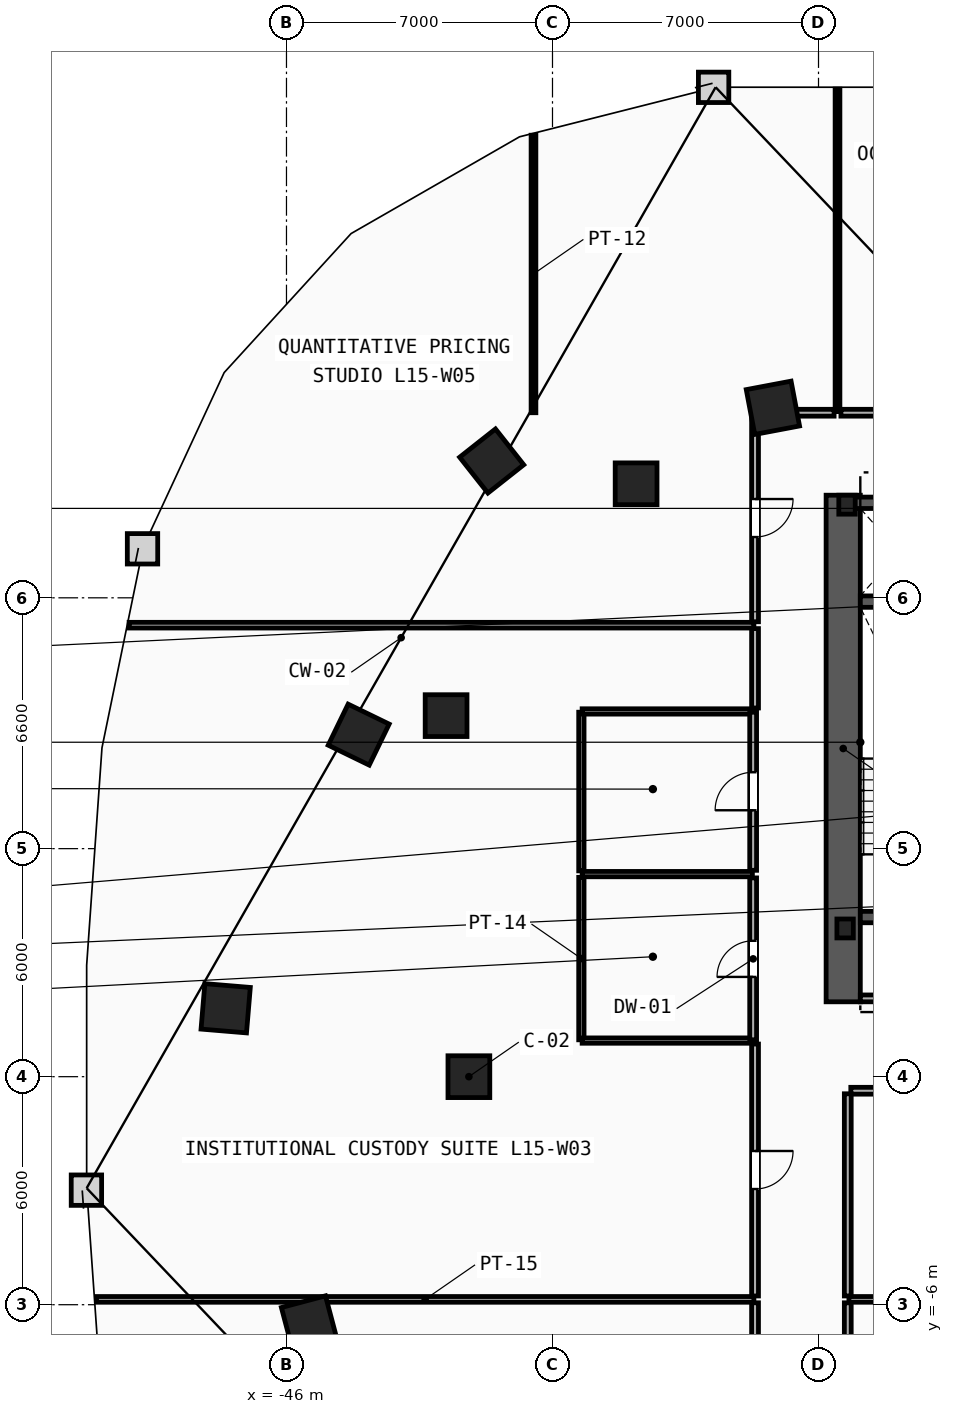
"""IFC4 building model, lengths in metres.
Left out: names, types, materials, properties, quantities, classifications, styles, units other than length and angle.
Written with IfcOpenShell. Run it as: python <this file> out.ifc"""

import sys

from ifc_helpers import new_model, si_unit, direction, frame, frame_2d, origin, origin_2d, place, context, subcontext, project, spatial, rectangle, i_section, extrude, element, fill, save


model = new_model("IFC4")
c1 = context("Model", 3, precision=1e-05, world=origin(), true_north=direction((0.0, 1.0)))
c2 = subcontext(c1, "Body", "Model", "MODEL_VIEW")
j1 = project(units=[si_unit("LENGTHUNIT", "METRE"), si_unit("PLANEANGLEUNIT", "RADIAN")], contexts=[c1])
p1 = place(None, origin())
s1 = spatial("IfcSite", under=j1, at=p1, CompositionType="ELEMENT")
p2 = place(p1, origin())
s2 = spatial("IfcBuilding", under=s1, at=p2, CompositionType="ELEMENT")
p3 = place(p2, frame((0.0, 0.0, 62.0)))
s3 = spatial("IfcBuildingStorey", under=s2, at=p3, CompositionType="ELEMENT", Elevation=62.0)
for number, where, z_axis, x_axis in (
    (1, (-31.3, 3.9, 0.0), (0.0, 0.0, 1.0), (1.0, 0.0, 0.0)),
    (2, (-31.25, 15.05, 0.0), (0.0, 0.0, 1.0), (1.0, 0.0, 0.0)),
):
    element("IfcColumn", number, at=place(p3, frame(where, z_axis=z_axis, x_axis=x_axis)), inside=s3, PredefinedType="COLUMN", context=c2, shape_type="SweptSolid", body=[
        extrude(i_section(OverallWidth=0.432, OverallDepth=0.498, WebThickness=0.056, FlangeThickness=0.089, FilletRadius=0.018, at=origin_2d()), origin(), (0.0, 0.0, 1.0), 3.8),
    ])
for number, where, z_axis, x_axis in (
    (3, (-41.2, 0.0, 0.0), (0.0, 0.0, 1.0), (1.0, 0.0, 0.0)),
    (4, (-41.8, 9.5, 0.0), (0.0, 0.0, 1.0), (1.0, 0.0, 0.0)),
    (5, (-36.8, 15.6, 0.0), (0.0, 0.0, 1.0), (1.0, 0.0, 0.0)),
):
    element("IfcColumn", number, at=place(p3, frame(where, z_axis=z_axis, x_axis=x_axis)), inside=s3, PredefinedType="COLUMN", context=c2, shape_type="SweptSolid", body=[
        extrude(rectangle(XDim=1.1, YDim=1.1, at=origin_2d()), origin(), (0.0, 0.0, 1.0), 3.8),
    ])
for number, where, z_axis, x_axis in (
    (6, (-33.2, 17.6, 0.0), (0.0, 0.0, 1.0), (-0.983, -0.186, 0.0)),
    (7, (-40.6, 16.2, 0.0), (0.0, 0.0, 1.0), (-0.785, -0.619, 0.0)),
    (8, (-44.1, 9.0, 0.0), (0.0, 0.0, 1.0), (-0.437, -0.899, 0.0)),
    (9, (-47.6, 1.8, 0.0), (0.0, 0.0, 1.0), (-0.084, -0.997, 0.0)),
    (10, (-45.4, -6.5, 0.0), (0.0, 0.0, 1.0), (0.256, -0.967, 0.0)),
):
    element("IfcColumn", number, at=place(p3, frame(where, z_axis=z_axis, x_axis=x_axis)), inside=s3, PredefinedType="COLUMN", context=c2, shape_type="SweptSolid", body=[
        extrude(rectangle(XDim=1.2, YDim=1.2, at=origin_2d()), origin(), (0.0, 0.0, 1.0), 3.8),
    ])
p4 = place(p3, frame((-31.35, 1.97, 0.0), z_axis=(0.0, 0.0, 1.0), x_axis=(0.0, 1.0, 0.0)))
e11 = element("IfcWall", 11, at=p4, inside=s3, PredefinedType="SHEAR", context=c2, shape_type="SweptSolid", body=[
    extrude(rectangle(XDim=13.33, YDim=0.9, at=frame_2d((6.665, 0.0))), origin(), (0.0, 0.0, 1.0), 3.5),
])
p5 = place(p3, frame((-30.9, 4.2, 0.0), z_axis=(0.0, 0.0, 1.0), x_axis=(1.0, 0.0, 0.0)))
e12 = element("IfcWall", 12, at=p5, inside=s3, PredefinedType="SHEAR", context=c2, shape_type="SweptSolid", body=[
    extrude(rectangle(XDim=3.16, YDim=0.3, at=frame_2d((1.58, 0.0))), origin(), (0.0, 0.0, 1.0), 3.5),
])
p6 = place(p5, frame((1.03, 0.0, 0.0)))
e13 = element("IfcOpeningElement", 13, at=p6, cuts=e12, PredefinedType="OPENING", context=c2, shape_type="SweptSolid", body=[
    extrude(rectangle(XDim=1.1, YDim=2.15, at=frame_2d((0.55, 1.075))), frame((0.0, 0.16, 0.0), z_axis=(0.0, -1.0, 0.0), x_axis=(1.0, 0.0, 0.0)), (0.0, 0.0, 1.0), 0.32),
])
p7 = place(p3, frame((-30.9, 12.5, 0.0), z_axis=(0.0, 0.0, 1.0), x_axis=(1.0, 0.0, 0.0)))
e14 = element("IfcWall", 14, at=p7, inside=s3, PredefinedType="SHEAR", context=c2, shape_type="SweptSolid", body=[
    extrude(rectangle(XDim=3.16, YDim=0.3, at=frame_2d((1.58, 0.0))), origin(), (0.0, 0.0, 1.0), 3.5),
])
p8 = place(p3, frame((-30.9, 2.06, 0.0), z_axis=(0.0, 0.0, 1.0), x_axis=(1.0, 0.0, 0.0)))
e15 = element("IfcWall", 15, at=p8, inside=s3, PredefinedType="PARTITIONING", context=c2, shape_type="SweptSolid", body=[
    extrude(rectangle(XDim=3.16, YDim=0.18, at=frame_2d((1.58, 0.0))), origin(), (0.0, 0.0, 1.0), 3.5),
])
p9 = place(p8, frame((0.98, 0.0, 0.0)))
e16 = element("IfcOpeningElement", 16, at=p9, cuts=e15, PredefinedType="OPENING", context=c2, shape_type="SweptSolid", body=[
    extrude(rectangle(XDim=1.2, YDim=2.15, at=frame_2d((0.6, 1.075))), frame((0.0, 0.1, 0.0), z_axis=(0.0, -1.0, 0.0), x_axis=(1.0, 0.0, 0.0)), (0.0, 0.0, 1.0), 0.2),
])
p10 = place(p3, frame((-31.2, 15.1, 0.0), z_axis=(0.0, 0.0, 1.0), x_axis=(1.0, 0.0, 0.0)))
e17 = element("IfcWall", 17, at=p10, inside=s3, PredefinedType="SHEAR", context=c2, shape_type="SweptSolid", body=[
    extrude(rectangle(XDim=2.5, YDim=0.3, at=frame_2d((1.25, 0.0))), origin(), (0.0, 0.0, 1.0), 3.5),
])
p11 = place(p3, frame((-38.24, 0.97, 0.0), z_axis=(0.0, 0.0, 1.0), x_axis=(0.0, 1.0, 0.0)))
e18 = element("IfcWall", 18, at=p11, inside=s3, PredefinedType="PARTITIONING", context=c2, shape_type="SweptSolid", body=[
    extrude(rectangle(XDim=4.275, YDim=0.14, at=frame_2d((2.138, 0.0))), origin(), (0.0, 0.0, 1.0), 3.5),
])
p12 = place(p3, frame((-38.24, 5.415, 0.0), z_axis=(0.0, 0.0, 1.0), x_axis=(0.0, 1.0, 0.0)))
e19 = element("IfcWall", 19, at=p12, inside=s3, PredefinedType="PARTITIONING", context=c2, shape_type="SweptSolid", body=[
    extrude(rectangle(XDim=4.175, YDim=0.14, at=frame_2d((2.087, 0.0))), origin(), (0.0, 0.0, 1.0), 3.5),
])
for number, where, z_axis, x_axis in (
    (20, (-38.22, 0.95, 0.0), (0.0, 0.0, 1.0), (1.0, 0.0, 0.0)),
    (21, (-38.22, 5.33, 0.0), (0.0, 0.0, 1.0), (1.0, 0.0, 0.0)),
    (22, (-38.22, 9.61, 0.0), (0.0, 0.0, 1.0), (1.0, 0.0, 0.0)),
):
    element("IfcWall", number, at=place(p3, frame(where, z_axis=z_axis, x_axis=x_axis)), inside=s3, PredefinedType="PARTITIONING", context=c2, shape_type="SweptSolid", body=[
        extrude(rectangle(XDim=4.48, YDim=0.14, at=frame_2d((2.24, 0.0))), origin(), (0.0, 0.0, 1.0), 3.5),
    ])
p13 = place(p3, frame((-33.72, 0.97, 0.0), z_axis=(0.0, 0.0, 1.0), x_axis=(0.0, 1.0, 0.0)))
e23 = element("IfcWall", 23, at=p13, inside=s3, PredefinedType="PARTITIONING", context=c2, shape_type="SweptSolid", body=[
    extrude(rectangle(XDim=4.26, YDim=0.18, at=frame_2d((2.13, 0.0))), origin(), (0.0, 0.0, 1.0), 3.5),
])
p14 = place(p13, frame((1.655, 0.0, 0.0)))
e24 = element("IfcOpeningElement", 24, at=p14, cuts=e23, PredefinedType="OPENING", context=c2, shape_type="SweptSolid", body=[
    extrude(rectangle(XDim=0.95, YDim=2.1, at=frame_2d((0.475, 1.05))), frame((0.0, 0.1, 0.0), z_axis=(0.0, -1.0, 0.0), x_axis=(1.0, 0.0, 0.0)), (0.0, 0.0, 1.0), 0.2),
])
p15 = place(p3, frame((-33.72, 5.43, 0.0), z_axis=(0.0, 0.0, 1.0), x_axis=(0.0, 1.0, 0.0)))
e25 = element("IfcWall", 25, at=p15, inside=s3, PredefinedType="PARTITIONING", context=c2, shape_type="SweptSolid", body=[
    extrude(rectangle(XDim=4.16, YDim=0.18, at=frame_2d((2.08, 0.0))), origin(), (0.0, 0.0, 1.0), 3.5),
])
p16 = place(p15, frame((1.58, 0.0, 0.0)))
e26 = element("IfcOpeningElement", 26, at=p16, cuts=e25, PredefinedType="OPENING", context=c2, shape_type="SweptSolid", body=[
    extrude(rectangle(XDim=1.0, YDim=2.15, at=frame_2d((0.5, 1.075))), frame((0.0, 0.1, 0.0), z_axis=(0.0, -1.0, 0.0), x_axis=(1.0, 0.0, 0.0)), (0.0, 0.0, 1.0), 0.2),
])
p17 = place(p3, frame((-51.002, -5.86, 0.0), z_axis=(0.0, 0.0, 1.0), x_axis=(1.0, 0.0, 0.0)))
e27 = element("IfcWall", 27, at=p17, inside=s3, PredefinedType="PARTITIONING", context=c2, shape_type="SweptSolid", body=[
    extrude(rectangle(XDim=17.302, YDim=0.15, at=frame_2d((8.651, 0.0))), origin(), (0.0, 0.0, 1.0), 3.5),
])
p18 = place(p3, frame((-31.2, -5.86, 0.0), z_axis=(0.0, 0.0, 1.0), x_axis=(1.0, 0.0, 0.0)))
e28 = element("IfcWall", 28, at=p18, inside=s3, PredefinedType="PARTITIONING", context=c2, shape_type="SweptSolid", body=[
    extrude(rectangle(XDim=18.202, YDim=0.15, at=frame_2d((9.101, 0.0))), origin(), (0.0, 0.0, 1.0), 3.5),
])
p19 = place(p3, frame((-50.141, 11.88, 0.0), z_axis=(0.0, 0.0, 1.0), x_axis=(1.0, 0.0, 0.0)))
e29 = element("IfcWall", 29, at=p19, inside=s3, PredefinedType="PARTITIONING", context=c2, shape_type="SweptSolid", body=[
    extrude(rectangle(XDim=16.441, YDim=0.15, at=frame_2d((8.22, 0.0))), origin(), (0.0, 0.0, 1.0), 3.5),
])
p20 = place(p3, frame((-39.5, 17.47, 0.0), z_axis=(0.0, 0.0, 1.0), x_axis=(0.0, 1.0, 0.0)))
e30 = element("IfcWall", 30, at=p20, inside=s3, PredefinedType="PARTITIONING", context=c2, shape_type="SweptSolid", body=[
    extrude(rectangle(XDim=7.302, YDim=0.125, at=frame_2d((3.651, 0.0))), origin(), (0.0, 0.0, 1.0), 3.5),
])
p21 = place(p3, frame((-31.5, 17.5, 0.0), z_axis=(0.0, 0.0, 1.0), x_axis=(0.0, 1.0, 0.0)))
e31 = element("IfcWall", 31, at=p21, inside=s3, PredefinedType="PARTITIONING", context=c2, shape_type="SweptSolid", body=[
    extrude(rectangle(XDim=8.485, YDim=0.125, at=frame_2d((4.243, 0.0))), origin(), (0.0, 0.0, 1.0), 3.5),
])
for number, where, z_axis, x_axis in (
    (32, (-33.67, -5.95, 0.0), (0.0, 0.0, 1.0), (0.0, -1.0, 0.0)),
    (33, (-31.23, -11.4, 0.0), (0.0, 0.0, 1.0), (0.0, 1.0, 0.0)),
):
    element("IfcWall", number, at=place(p3, frame(where, z_axis=z_axis, x_axis=x_axis)), inside=s3, PredefinedType="PARTITIONING", context=c2, shape_type="SweptSolid", body=[
        extrude(rectangle(XDim=5.45, YDim=0.18, at=frame_2d((2.725, 0.0))), origin(), (0.0, 0.0, 1.0), 3.5),
    ])
p22 = place(p3, frame((-33.67, 0.859, 0.0), z_axis=(0.0, 0.0, 1.0), x_axis=(0.0, -1.0, 0.0)))
e34 = element("IfcWall", 34, at=p22, inside=s3, PredefinedType="PARTITIONING", context=c2, shape_type="SweptSolid", body=[
    extrude(rectangle(XDim=6.629, YDim=0.18, at=frame_2d((3.314, 0.0))), origin(), (0.0, 0.0, 1.0), 3.5),
])
p23 = place(p22, frame((2.814, 0.0, 0.0)))
e35 = element("IfcOpeningElement", 35, at=p23, cuts=e34, PredefinedType="OPENING", context=c2, shape_type="SweptSolid", body=[
    extrude(rectangle(XDim=1.0, YDim=2.15, at=frame_2d((0.5, 1.075))), frame((0.0, 0.1, 0.0), z_axis=(0.0, -1.0, 0.0), x_axis=(1.0, 0.0, 0.0)), (0.0, 0.0, 1.0), 0.2),
])
p24 = place(p3, frame((-33.67, 11.79, 0.0), z_axis=(0.0, 0.0, 1.0), x_axis=(0.0, -1.0, 0.0)))
e36 = element("IfcWall", 36, at=p24, inside=s3, PredefinedType="PARTITIONING", context=c2, shape_type="SweptSolid", body=[
    extrude(rectangle(XDim=2.089, YDim=0.18, at=frame_2d((1.044, 0.0))), origin(), (0.0, 0.0, 1.0), 3.5),
])
p25 = place(p3, frame((-31.15, -0.37, 0.0), z_axis=(0.0, 0.0, 1.0), x_axis=(1.0, 0.0, 0.0)))
e37 = element("IfcWall", 37, at=p25, inside=s3, PredefinedType="PARTITIONING", context=c2, shape_type="SweptSolid", body=[
    extrude(rectangle(XDim=14.328, YDim=0.18, at=frame_2d((7.164, 0.0))), origin(), (0.0, 0.0, 1.0), 3.5),
])
p26 = place(p25, frame((6.664, 0.0, 0.0)))
e38 = element("IfcOpeningElement", 38, at=p26, cuts=e37, PredefinedType="OPENING", context=c2, shape_type="SweptSolid", body=[
    extrude(rectangle(XDim=1.0, YDim=2.15, at=frame_2d((0.5, 1.075))), frame((0.0, 0.1, 0.0), z_axis=(0.0, -1.0, 0.0), x_axis=(1.0, 0.0, 0.0)), (0.0, 0.0, 1.0), 0.2),
])
p27 = place(p3, frame((-31.23, -5.77, 0.0), z_axis=(0.0, 0.0, 1.0), x_axis=(0.0, 1.0, 0.0)))
e39 = element("IfcWall", 39, at=p27, inside=s3, PredefinedType="PARTITIONING", context=c2, shape_type="SweptSolid", body=[
    extrude(rectangle(XDim=5.32, YDim=0.18, at=frame_2d((2.66, 0.0))), origin(), (0.0, 0.0, 1.0), 3.5),
])
p28 = place(p3, frame((-33.67, 17.428, 0.0), z_axis=(0.0, 0.0, 1.0), x_axis=(0.0, -1.0, 0.0)))
e40 = element("IfcWall", 40, at=p28, inside=s3, PredefinedType="PARTITIONING", context=c2, shape_type="SweptSolid", body=[
    extrude(rectangle(XDim=5.458, YDim=0.18, at=frame_2d((2.729, 0.0))), origin(), (0.0, 0.0, 1.0), 3.5),
])
p29 = place(p28, frame((2.229, 0.0, 0.0)))
e41 = element("IfcOpeningElement", 41, at=p29, cuts=e40, PredefinedType="OPENING", context=c2, shape_type="SweptSolid", body=[
    extrude(rectangle(XDim=1.0, YDim=2.15, at=frame_2d((0.5, 1.075))), frame((0.0, 0.1, 0.0), z_axis=(0.0, -1.0, 0.0), x_axis=(1.0, 0.0, 0.0)), (0.0, 0.0, 1.0), 0.2),
])
p30 = place(p3, frame((-31.59, 17.47, 0.0), z_axis=(0.0, 0.0, 1.0), x_axis=(-1.0, 0.0, 0.0)))
e42 = element("IfcWall", 42, at=p30, inside=s3, PredefinedType="PARTITIONING", context=c2, shape_type="SweptSolid", body=[
    extrude(rectangle(XDim=2.038, YDim=0.18, at=frame_2d((1.019, 0.0))), origin(), (0.0, 0.0, 1.0), 3.5),
])
p31 = place(p3, frame((-24.59, 17.47, 0.0), z_axis=(0.0, 0.0, 1.0), x_axis=(-1.0, 0.0, 0.0)))
e43 = element("IfcWall", 43, at=p31, inside=s3, PredefinedType="PARTITIONING", context=c2, shape_type="SweptSolid", body=[
    extrude(rectangle(XDim=6.82, YDim=0.18, at=frame_2d((3.41, 0.0))), origin(), (0.0, 0.0, 1.0), 3.5),
])
p32 = place(p31, frame((2.91, 0.0, 0.0)))
e44 = element("IfcOpeningElement", 44, at=p32, cuts=e43, PredefinedType="OPENING", context=c2, shape_type="SweptSolid", body=[
    extrude(rectangle(XDim=1.0, YDim=2.15, at=frame_2d((0.5, 1.075))), frame((0.0, 0.1, 0.0), z_axis=(0.0, -1.0, 0.0), x_axis=(1.0, 0.0, 0.0)), (0.0, 0.0, 1.0), 0.2),
])
p33 = place(p23, origin())
e45 = element("IfcDoor", 45, at=p33, inside=s3, OperationType="SINGLE_SWING_LEFT", PredefinedType="DOOR", context=c2, shape_type="SweptSolid", body=[
    extrude(rectangle(XDim=1.0, YDim=2.15, at=frame_2d((0.5, 1.075))), frame((0.0, 0.025, 0.0), z_axis=(0.0, -1.0, 0.0), x_axis=(1.0, 0.0, 0.0)), (0.0, 0.0, 1.0), 0.05),
])
fill(e35, e45)
p34 = place(p29, origin())
e46 = element("IfcDoor", 46, at=p34, inside=s3, OperationType="SINGLE_SWING_LEFT", PredefinedType="DOOR", context=c2, shape_type="SweptSolid", body=[
    extrude(rectangle(XDim=1.0, YDim=2.15, at=frame_2d((0.5, 1.075))), frame((0.0, 0.025, 0.0), z_axis=(0.0, -1.0, 0.0), x_axis=(1.0, 0.0, 0.0)), (0.0, 0.0, 1.0), 0.05),
])
fill(e41, e46)
p35 = place(p14, origin())
e47 = element("IfcDoor", 47, at=p35, inside=s3, OperationType="SINGLE_SWING_LEFT", PredefinedType="DOOR", context=c2, shape_type="SweptSolid", body=[
    extrude(rectangle(XDim=0.95, YDim=2.1, at=frame_2d((0.475, 1.05))), frame((0.0, 0.025, 0.0), z_axis=(0.0, -1.0, 0.0), x_axis=(1.0, 0.0, 0.0)), (0.0, 0.0, 1.0), 0.05),
])
fill(e24, e47)
p36 = place(p16, origin())
e48 = element("IfcDoor", 48, at=p36, inside=s3, OperationType="SINGLE_SWING_LEFT", PredefinedType="DOOR", context=c2, shape_type="SweptSolid", body=[
    extrude(rectangle(XDim=1.0, YDim=2.15, at=frame_2d((0.5, 1.075))), frame((0.0, 0.025, 0.0), z_axis=(0.0, -1.0, 0.0), x_axis=(1.0, 0.0, 0.0)), (0.0, 0.0, 1.0), 0.05),
])
fill(e26, e48)
save(model, sys.argv[1])
